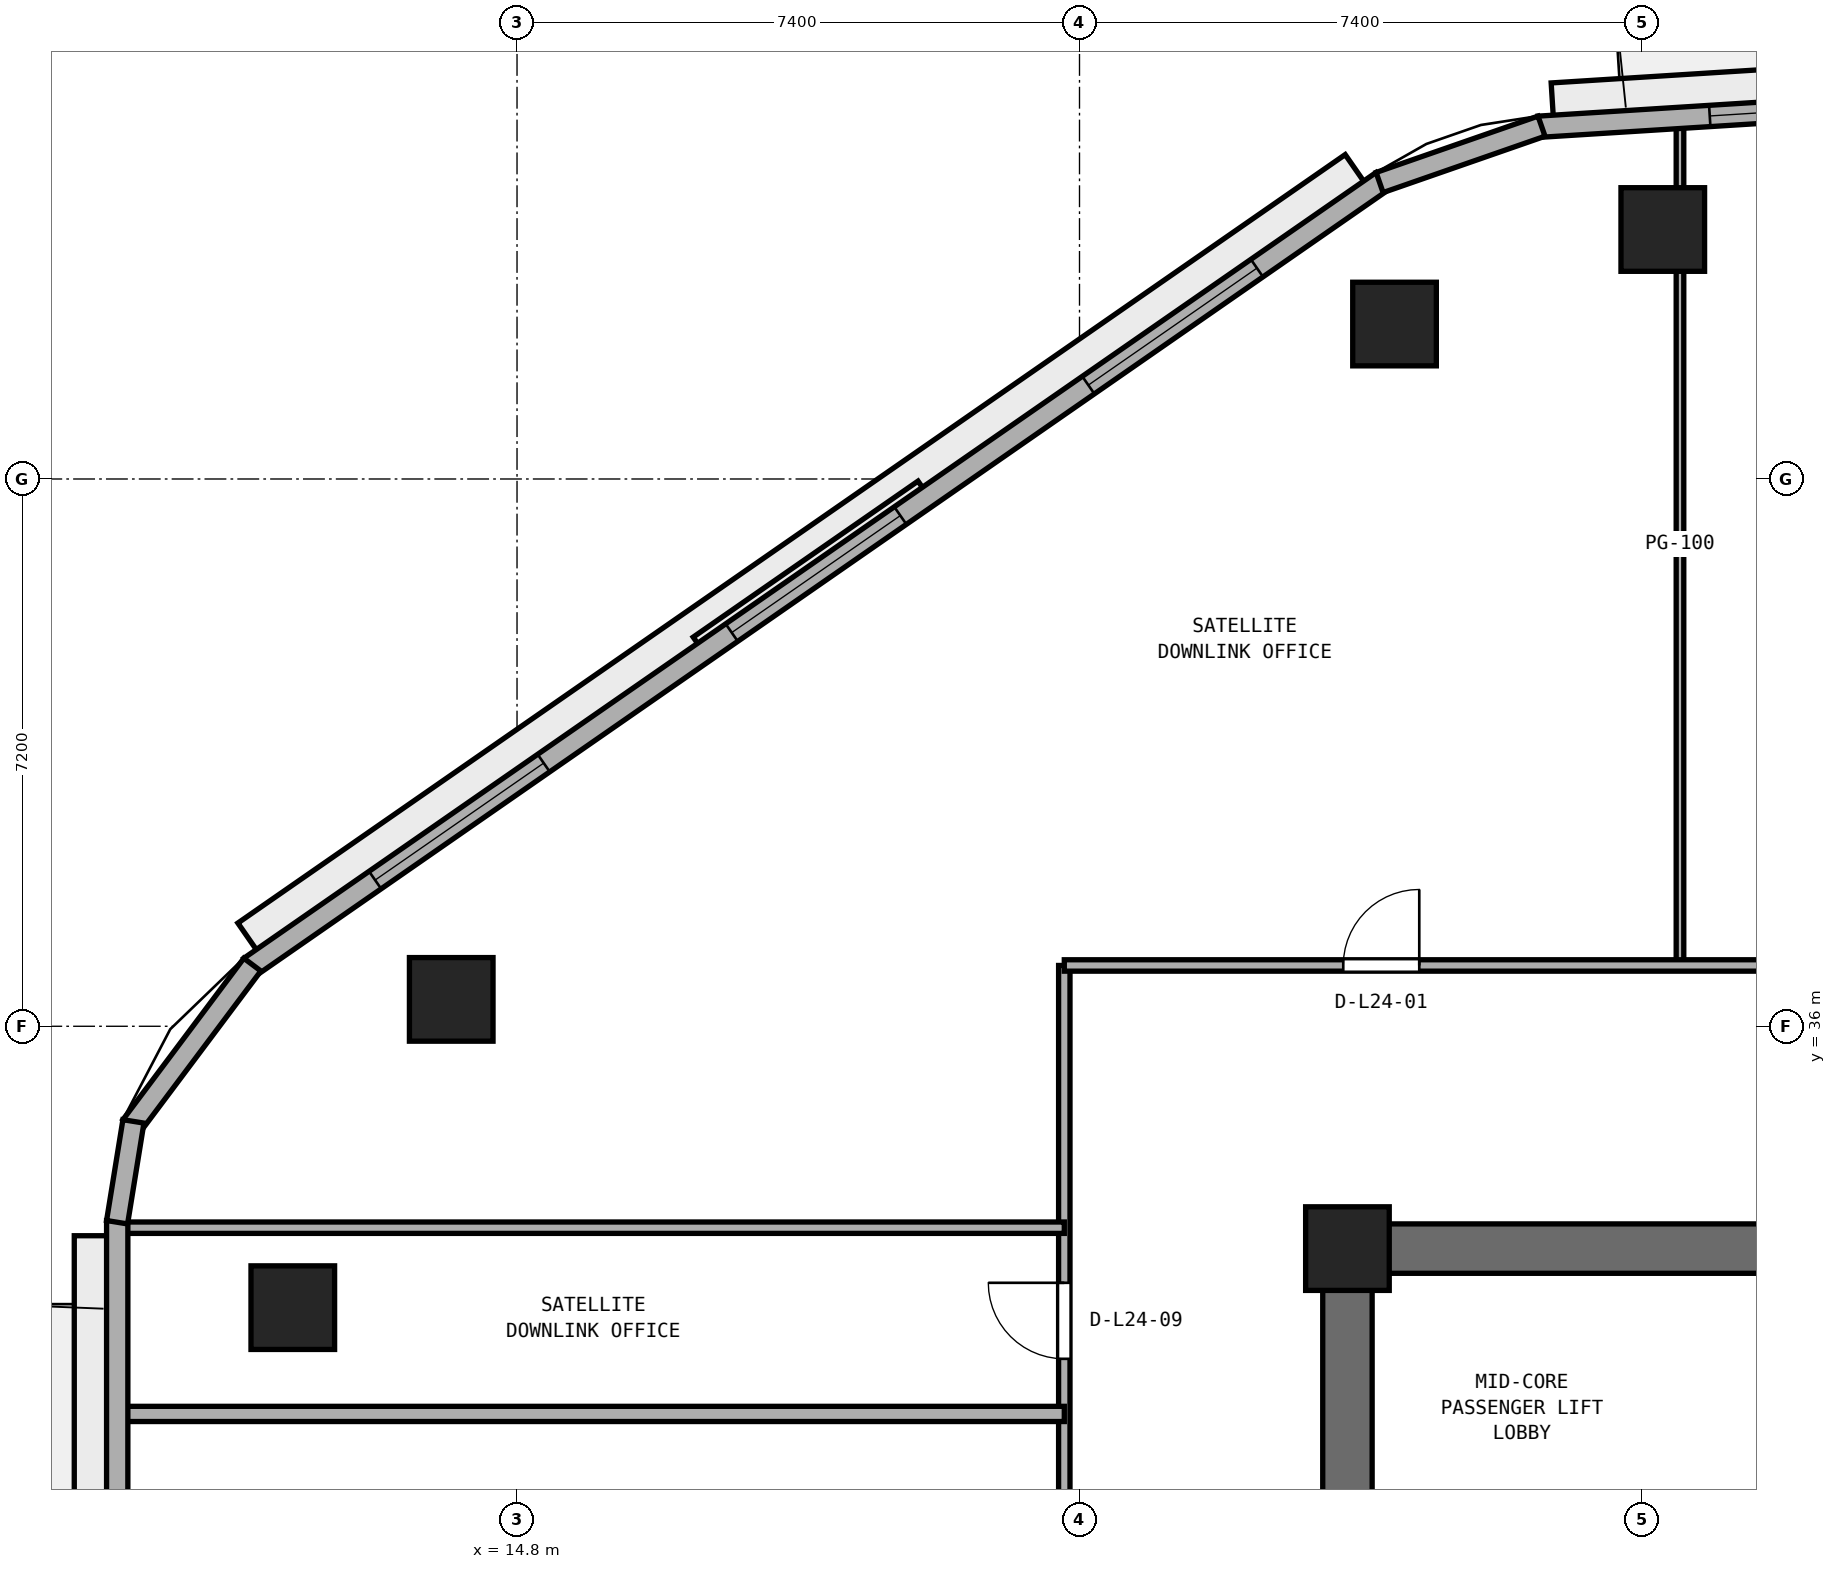
"""IFC4 building model, lengths in metres.
Left out: names, types, materials, properties, quantities, classifications, styles, units other than length and angle.
Written with IfcOpenShell. Run it as: python <this file> out.ifc"""

import sys

from ifc_helpers import new_model, si_unit, direction, frame, frame_2d, origin, origin_2d, place, context, subcontext, project, spatial, rectangle, extrude, element, fill, save


model = new_model("IFC4")
c1 = context("Model", 3, precision=1e-05, world=origin(), true_north=direction((0.0, 1.0)))
c2 = subcontext(c1, "Body", "Model", "MODEL_VIEW")
j1 = project(units=[si_unit("LENGTHUNIT", "METRE"), si_unit("PLANEANGLEUNIT", "RADIAN")], contexts=[c1])
p1 = place(None, origin())
s1 = spatial("IfcSite", under=j1, at=p1, CompositionType="ELEMENT")
p2 = place(p1, origin())
s2 = spatial("IfcBuilding", under=s1, at=p2, CompositionType="ELEMENT")
p3 = place(p2, frame((0.0, 0.0, 97.2)))
s3 = spatial("IfcBuildingStorey", under=s2, at=p3, CompositionType="ELEMENT", Elevation=97.2)
p4 = place(p3, frame((25.4, 33.075, 0.0), z_axis=(0.0, 0.0, 1.0), x_axis=(1.0, 0.0, 0.0)))
e1 = element("IfcWall", 1, at=p4, inside=s3, PredefinedType="SHEAR", context=c2, shape_type="SweptSolid", body=[
    extrude(rectangle(XDim=23.2, YDim=0.65, at=frame_2d((11.6, 0.0))), origin(), (0.0, 0.0, 1.0), 3.525),
])
p5 = place(p3, frame((25.725, 17.65, 0.0), z_axis=(0.0, 0.0, 1.0), x_axis=(0.0, 1.0, 0.0)))
e2 = element("IfcWall", 2, at=p5, inside=s3, PredefinedType="SHEAR", context=c2, shape_type="SweptSolid", body=[
    extrude(rectangle(XDim=15.1, YDim=0.65, at=frame_2d((7.55, 0.0))), origin(), (0.0, 0.0, 1.0), 3.525),
])
p6 = place(p5, frame((6.8, 0.0, 0.0)))
e3 = element("IfcOpeningElement", 3, at=p6, cuts=e2, PredefinedType="OPENING", context=c2, shape_type="SweptSolid", body=[
    extrude(rectangle(XDim=1.5, YDim=2.15, at=frame_2d((0.75, 1.075))), frame((0.0, 0.335, 0.0), z_axis=(0.0, -1.0, 0.0), x_axis=(1.0, 0.0, 0.0)), (0.0, 0.0, 1.0), 0.67),
])
p7 = place(p3, frame((25.725, 33.075, 0.0), z_axis=(0.0, 0.0, 1.0), x_axis=(1.0, 0.0, 0.0)))
e4 = element("IfcColumn", 4, at=p7, inside=s3, PredefinedType="PILASTER", context=c2, shape_type="SweptSolid", body=[
    extrude(rectangle(XDim=1.1, YDim=1.1, at=origin_2d()), origin(), (0.0, 0.0, 1.0), 3.8),
])
for number, where, z_axis, x_axis in (
    (5, (29.874, 46.482, 0.0), (0.0, 0.0, 1.0), (1.0, 0.0, 0.0)),
    (6, (26.344, 45.238, 0.0), (0.0, 0.0, 1.0), (1.0, 0.0, 0.0)),
    (7, (13.934, 36.354, 0.0), (0.0, 0.0, 1.0), (1.0, 0.0, 0.0)),
    (8, (11.85, 32.298, 0.0), (0.0, 0.0, 1.0), (1.0, 0.0, 0.0)),
):
    element("IfcColumn", number, at=place(p3, frame(where, z_axis=z_axis, x_axis=x_axis)), inside=s3, PredefinedType="COLUMN", context=c2, shape_type="SweptSolid", body=[
        extrude(rectangle(XDim=1.1, YDim=1.1, at=origin_2d()), origin(), (0.0, 0.0, 1.0), 3.8),
    ])
p8 = place(p3, frame((30.1, 36.8, 0.0), z_axis=(0.0, 0.0, 1.0), x_axis=(0.0, 1.0, 0.0)))
e9 = element("IfcWall", 9, at=p8, inside=s3, PredefinedType="PARTITIONING", context=c2, shape_type="SweptSolid", body=[
    extrude(rectangle(XDim=11.086, YDim=0.1, at=frame_2d((5.543, 0.0))), origin(), (0.0, 0.0, 1.0), 3.525),
])
p9 = place(p3, frame((22.0, 5.894, 0.0), z_axis=(0.0, 0.0, 1.0), x_axis=(0.0, 1.0, 0.0)))
e10 = element("IfcWall", 10, at=p9, inside=s3, PredefinedType="PARTITIONING", context=c2, shape_type="SweptSolid", body=[
    extrude(rectangle(XDim=30.906, YDim=0.15, at=frame_2d((15.453, 0.0))), origin(), (0.0, 0.0, 1.0), 3.525),
])
p10 = place(p9, frame((12.156, 0.0, 0.0)))
e11 = element("IfcOpeningElement", 11, at=p10, cuts=e10, PredefinedType="OPENING", context=c2, shape_type="SweptSolid", body=[
    extrude(rectangle(XDim=0.9, YDim=2.1, at=frame_2d((0.45, 1.05))), frame((0.0, 0.085, 0.0), z_axis=(0.0, -1.0, 0.0), x_axis=(1.0, 0.0, 0.0)), (0.0, 0.0, 1.0), 0.17),
])
p11 = place(p9, frame((20.806, 0.0, 0.0)))
e12 = element("IfcOpeningElement", 12, at=p11, cuts=e10, PredefinedType="OPENING", context=c2, shape_type="SweptSolid", body=[
    extrude(rectangle(XDim=0.9, YDim=2.1, at=frame_2d((0.45, 1.05))), frame((0.0, 0.085, 0.0), z_axis=(0.0, -1.0, 0.0), x_axis=(1.0, 0.0, 0.0)), (0.0, 0.0, 1.0), 0.17),
])
p12 = place(p9, frame((25.731, 0.0, 0.0)))
e13 = element("IfcOpeningElement", 13, at=p12, cuts=e10, PredefinedType="OPENING", context=c2, shape_type="SweptSolid", body=[
    extrude(rectangle(XDim=1.0, YDim=2.12, at=frame_2d((0.5, 1.06))), frame((0.0, 0.085, 0.0), z_axis=(0.0, -1.0, 0.0), x_axis=(1.0, 0.0, 0.0)), (0.0, 0.0, 1.0), 0.17),
])
p13 = place(p3, frame((9.605, 30.9, 0.0), z_axis=(0.0, 0.0, 1.0), x_axis=(1.0, 0.0, 0.0)))
e14 = element("IfcWall", 14, at=p13, inside=s3, PredefinedType="PARTITIONING", context=c2, shape_type="SweptSolid", body=[
    extrude(rectangle(XDim=12.395, YDim=0.2, at=frame_2d((6.198, 0.0))), origin(), (0.0, 0.0, 1.0), 3.525),
])
p14 = place(p3, frame((9.605, 33.35, 0.0), z_axis=(0.0, 0.0, 1.0), x_axis=(1.0, 0.0, 0.0)))
e15 = element("IfcWall", 15, at=p14, inside=s3, PredefinedType="PARTITIONING", context=c2, shape_type="SweptSolid", body=[
    extrude(rectangle(XDim=12.395, YDim=0.15, at=frame_2d((6.198, 0.0))), origin(), (0.0, 0.0, 1.0), 3.525),
])
p15 = place(p3, frame((22.0, 36.8, 0.0), z_axis=(0.0, 0.0, 1.0), x_axis=(1.0, 0.0, 0.0)))
e16 = element("IfcWall", 16, at=p15, inside=s3, PredefinedType="PARTITIONING", context=c2, shape_type="SweptSolid", body=[
    extrude(rectangle(XDim=30.0, YDim=0.15, at=frame_2d((15.0, 0.0))), origin(), (0.0, 0.0, 1.0), 3.525),
])
p16 = place(p15, frame((3.67, 0.0, 0.0)))
e17 = element("IfcOpeningElement", 17, at=p16, cuts=e16, PredefinedType="OPENING", context=c2, shape_type="SweptSolid", body=[
    extrude(rectangle(XDim=1.0, YDim=2.12, at=frame_2d((0.5, 1.06))), frame((0.0, 0.085, 0.0), z_axis=(0.0, -1.0, 0.0), x_axis=(1.0, 0.0, 0.0)), (0.0, 0.0, 1.0), 0.17),
])
p17 = place(p15, frame((11.9, 0.0, 0.0)))
e18 = element("IfcOpeningElement", 18, at=p17, cuts=e16, PredefinedType="OPENING", context=c2, shape_type="SweptSolid", body=[
    extrude(rectangle(XDim=1.0, YDim=2.12, at=frame_2d((0.5, 1.06))), frame((0.0, 0.085, 0.0), z_axis=(0.0, -1.0, 0.0), x_axis=(1.0, 0.0, 0.0)), (0.0, 0.0, 1.0), 0.17),
])
p18 = place(p15, frame((20.4, 0.0, 0.0)))
e19 = element("IfcOpeningElement", 19, at=p18, cuts=e16, PredefinedType="OPENING", context=c2, shape_type="SweptSolid", body=[
    extrude(rectangle(XDim=1.0, YDim=2.12, at=frame_2d((0.5, 1.06))), frame((0.0, 0.085, 0.0), z_axis=(0.0, -1.0, 0.0), x_axis=(1.0, 0.0, 0.0)), (0.0, 0.0, 1.0), 0.17),
])
p19 = place(p15, frame((26.93, 0.0, 0.0)))
e20 = element("IfcOpeningElement", 20, at=p19, cuts=e16, PredefinedType="OPENING", context=c2, shape_type="SweptSolid", body=[
    extrude(rectangle(XDim=1.0, YDim=2.12, at=frame_2d((0.5, 1.06))), frame((0.0, 0.085, 0.0), z_axis=(0.0, -1.0, 0.0), x_axis=(1.0, 0.0, 0.0)), (0.0, 0.0, 1.0), 0.17),
])
p20 = place(p3, frame((47.832, 49.069, 0.0), z_axis=(0.0, 0.0, 1.0), x_axis=(-0.998017725054, -0.062933460723, 0.0)))
e21 = element("IfcWall", 21, at=p20, inside=s3, PredefinedType="STANDARD", context=c2, shape_type="SweptSolid", body=[
    extrude(rectangle(XDim=19.629, YDim=0.28, at=frame_2d((9.815, 0.0))), origin(), (0.0, 0.0, 1.0), 3.525),
])
p21 = place(p20, frame((9.565, 0.0, 0.0)))
e22 = element("IfcOpeningElement", 22, at=p21, cuts=e21, PredefinedType="OPENING", context=c2, shape_type="SweptSolid", body=[
    extrude(rectangle(XDim=1.1, YDim=2.2, at=frame_2d((0.55, 1.1))), frame((0.0, 0.15, 0.0), z_axis=(0.0, -1.0, 0.0), x_axis=(1.0, 0.0, 0.0)), (0.0, 0.0, 1.0), 0.3),
])
p22 = place(p20, frame((2.255, 0.0, 0.9)))
e23 = element("IfcOpeningElement", 23, at=p22, cuts=e21, PredefinedType="OPENING", context=c2, shape_type="SweptSolid", body=[
    extrude(rectangle(XDim=2.7, YDim=1.75, at=frame_2d((1.35, 0.875))), frame((0.0, 0.15, 0.0), z_axis=(0.0, -1.0, 0.0), x_axis=(1.0, 0.0, 0.0)), (0.0, 0.0, 1.0), 0.3),
])
p23 = place(p20, frame((14.675, 0.0, 0.9)))
e24 = element("IfcOpeningElement", 24, at=p23, cuts=e21, PredefinedType="OPENING", context=c2, shape_type="SweptSolid", body=[
    extrude(rectangle(XDim=2.7, YDim=1.75, at=frame_2d((1.35, 0.875))), frame((0.0, 0.15, 0.0), z_axis=(0.0, -1.0, 0.0), x_axis=(1.0, 0.0, 0.0)), (0.0, 0.0, 1.0), 0.3),
])
p24 = place(p3, frame((26.182, 47.118, 0.0), z_axis=(0.0, 0.0, 1.0), x_axis=(-0.821547956627, -0.570139417127, 0.0)))
e25 = element("IfcWall", 25, at=p24, inside=s3, PredefinedType="STANDARD", context=c2, shape_type="SweptSolid", body=[
    extrude(rectangle(XDim=18.132, YDim=0.28, at=frame_2d((9.066, 0.0))), origin(), (0.0, 0.0, 1.0), 3.525),
])
p25 = place(p24, frame((2.005, 0.0, 0.9)))
e26 = element("IfcOpeningElement", 26, at=p25, cuts=e25, PredefinedType="OPENING", context=c2, shape_type="SweptSolid", body=[
    extrude(rectangle(XDim=2.7, YDim=1.75, at=frame_2d((1.35, 0.875))), frame((0.0, 0.15, 0.0), z_axis=(0.0, -1.0, 0.0), x_axis=(1.0, 0.0, 0.0)), (0.0, 0.0, 1.0), 0.3),
])
p26 = place(p24, frame((7.716, 0.0, 0.9)))
e27 = element("IfcOpeningElement", 27, at=p26, cuts=e25, PredefinedType="OPENING", context=c2, shape_type="SweptSolid", body=[
    extrude(rectangle(XDim=2.7, YDim=1.75, at=frame_2d((1.35, 0.875))), frame((0.0, 0.15, 0.0), z_axis=(0.0, -1.0, 0.0), x_axis=(1.0, 0.0, 0.0)), (0.0, 0.0, 1.0), 0.3),
])
p27 = place(p24, frame((13.427, 0.0, 0.9)))
e28 = element("IfcOpeningElement", 28, at=p27, cuts=e25, PredefinedType="OPENING", context=c2, shape_type="SweptSolid", body=[
    extrude(rectangle(XDim=2.7, YDim=1.75, at=frame_2d((1.35, 0.875))), frame((0.0, 0.15, 0.0), z_axis=(0.0, -1.0, 0.0), x_axis=(1.0, 0.0, 0.0)), (0.0, 0.0, 1.0), 0.3),
])
p28 = place(p3, frame((9.54, 33.444, 0.0), z_axis=(0.0, 0.0, 1.0), x_axis=(0.0, -1.0, 0.0)))
e29 = element("IfcWall", 29, at=p28, inside=s3, PredefinedType="STANDARD", context=c2, shape_type="SweptSolid", body=[
    extrude(rectangle(XDim=17.301, YDim=0.28, at=frame_2d((8.65, 0.0))), origin(), (0.0, 0.0, 1.0), 3.525),
])
p29 = place(p28, frame((8.1, 0.0, 0.0)))
e30 = element("IfcOpeningElement", 30, at=p29, cuts=e29, PredefinedType="OPENING", context=c2, shape_type="SweptSolid", body=[
    extrude(rectangle(XDim=1.1, YDim=2.2, at=frame_2d((0.55, 1.1))), frame((0.0, 0.15, 0.0), z_axis=(0.0, -1.0, 0.0), x_axis=(1.0, 0.0, 0.0)), (0.0, 0.0, 1.0), 0.3),
])
p30 = place(p28, frame((12.734, 0.0, 0.9)))
e31 = element("IfcOpeningElement", 31, at=p30, cuts=e29, PredefinedType="OPENING", context=c2, shape_type="SweptSolid", body=[
    extrude(rectangle(XDim=2.7, YDim=1.75, at=frame_2d((1.35, 0.875))), frame((0.0, 0.15, 0.0), z_axis=(0.0, -1.0, 0.0), x_axis=(1.0, 0.0, 0.0)), (0.0, 0.0, 1.0), 0.3),
])
p31 = place(p3, frame((28.278, 47.842, 0.0), z_axis=(0.0, 0.0, 1.0), x_axis=(-0.9444559001, -0.328638179106, 0.0)))
e32 = element("IfcWall", 32, at=p31, inside=s3, PredefinedType="STANDARD", context=c2, shape_type="SweptSolid", body=[
    extrude(rectangle(XDim=2.255, YDim=0.28, at=frame_2d((1.128, 0.0))), origin(), (0.0, 0.0, 1.0), 3.525),
])
p32 = place(p3, frame((11.318, 36.811, 0.0), z_axis=(0.0, 0.0, 1.0), x_axis=(-0.599455152629, -0.800408345775, 0.0)))
e33 = element("IfcWall", 33, at=p32, inside=s3, PredefinedType="STANDARD", context=c2, shape_type="SweptSolid", body=[
    extrude(rectangle(XDim=2.653, YDim=0.28, at=frame_2d((1.327, 0.0))), origin(), (0.0, 0.0, 1.0), 3.525),
])
p33 = place(p3, frame((9.753, 34.749, 0.0), z_axis=(0.0, 0.0, 1.0), x_axis=(-0.160037671962, -0.987110907423, 0.0)))
e34 = element("IfcWall", 34, at=p33, inside=s3, PredefinedType="STANDARD", context=c2, shape_type="SweptSolid", body=[
    extrude(rectangle(XDim=1.344, YDim=0.28, at=frame_2d((0.672, 0.0))), origin(), (0.0, 0.0, 1.0), 3.525),
])
p34 = place(p16, origin())
e35 = element("IfcDoor", 35, at=p34, inside=s3, OperationType="SINGLE_SWING_RIGHT", PredefinedType="DOOR", context=c2, shape_type="SweptSolid", body=[
    extrude(rectangle(XDim=1.0, YDim=2.12, at=frame_2d((0.5, 1.06))), frame((0.0, 0.025, 0.0), z_axis=(0.0, -1.0, 0.0), x_axis=(1.0, 0.0, 0.0)), (0.0, 0.0, 1.0), 0.05),
])
fill(e17, e35)
p35 = place(p12, origin())
e36 = element("IfcDoor", 36, at=p35, inside=s3, OperationType="SINGLE_SWING_RIGHT", PredefinedType="DOOR", context=c2, shape_type="SweptSolid", body=[
    extrude(rectangle(XDim=1.0, YDim=2.12, at=frame_2d((0.5, 1.06))), frame((0.0, 0.025, 0.0), z_axis=(0.0, -1.0, 0.0), x_axis=(1.0, 0.0, 0.0)), (0.0, 0.0, 1.0), 0.05),
])
fill(e13, e36)
p36 = place(p23, origin())
e37 = element("IfcWindow", 37, at=p36, inside=s3, PartitioningType="SINGLE_PANEL", PredefinedType="WINDOW", context=c2, shape_type="SweptSolid", body=[
    extrude(rectangle(XDim=2.7, YDim=1.75, at=frame_2d((1.35, 0.875))), frame((0.0, 0.03, 0.0), z_axis=(0.0, -1.0, 0.0), x_axis=(1.0, 0.0, 0.0)), (0.0, 0.0, 1.0), 0.06),
])
fill(e24, e37)
p37 = place(p25, origin())
e38 = element("IfcWindow", 38, at=p37, inside=s3, PartitioningType="SINGLE_PANEL", PredefinedType="WINDOW", context=c2, shape_type="SweptSolid", body=[
    extrude(rectangle(XDim=2.7, YDim=1.75, at=frame_2d((1.35, 0.875))), frame((0.0, 0.03, 0.0), z_axis=(0.0, -1.0, 0.0), x_axis=(1.0, 0.0, 0.0)), (0.0, 0.0, 1.0), 0.06),
])
fill(e26, e38)
p38 = place(p26, origin())
e39 = element("IfcWindow", 39, at=p38, inside=s3, PartitioningType="SINGLE_PANEL", PredefinedType="WINDOW", context=c2, shape_type="SweptSolid", body=[
    extrude(rectangle(XDim=2.7, YDim=1.75, at=frame_2d((1.35, 0.875))), frame((0.0, 0.03, 0.0), z_axis=(0.0, -1.0, 0.0), x_axis=(1.0, 0.0, 0.0)), (0.0, 0.0, 1.0), 0.06),
])
fill(e27, e39)
p39 = place(p27, origin())
e40 = element("IfcWindow", 40, at=p39, inside=s3, PartitioningType="SINGLE_PANEL", PredefinedType="WINDOW", context=c2, shape_type="SweptSolid", body=[
    extrude(rectangle(XDim=2.7, YDim=1.75, at=frame_2d((1.35, 0.875))), frame((0.0, 0.03, 0.0), z_axis=(0.0, -1.0, 0.0), x_axis=(1.0, 0.0, 0.0)), (0.0, 0.0, 1.0), 0.06),
])
fill(e28, e40)
save(model, sys.argv[1])
